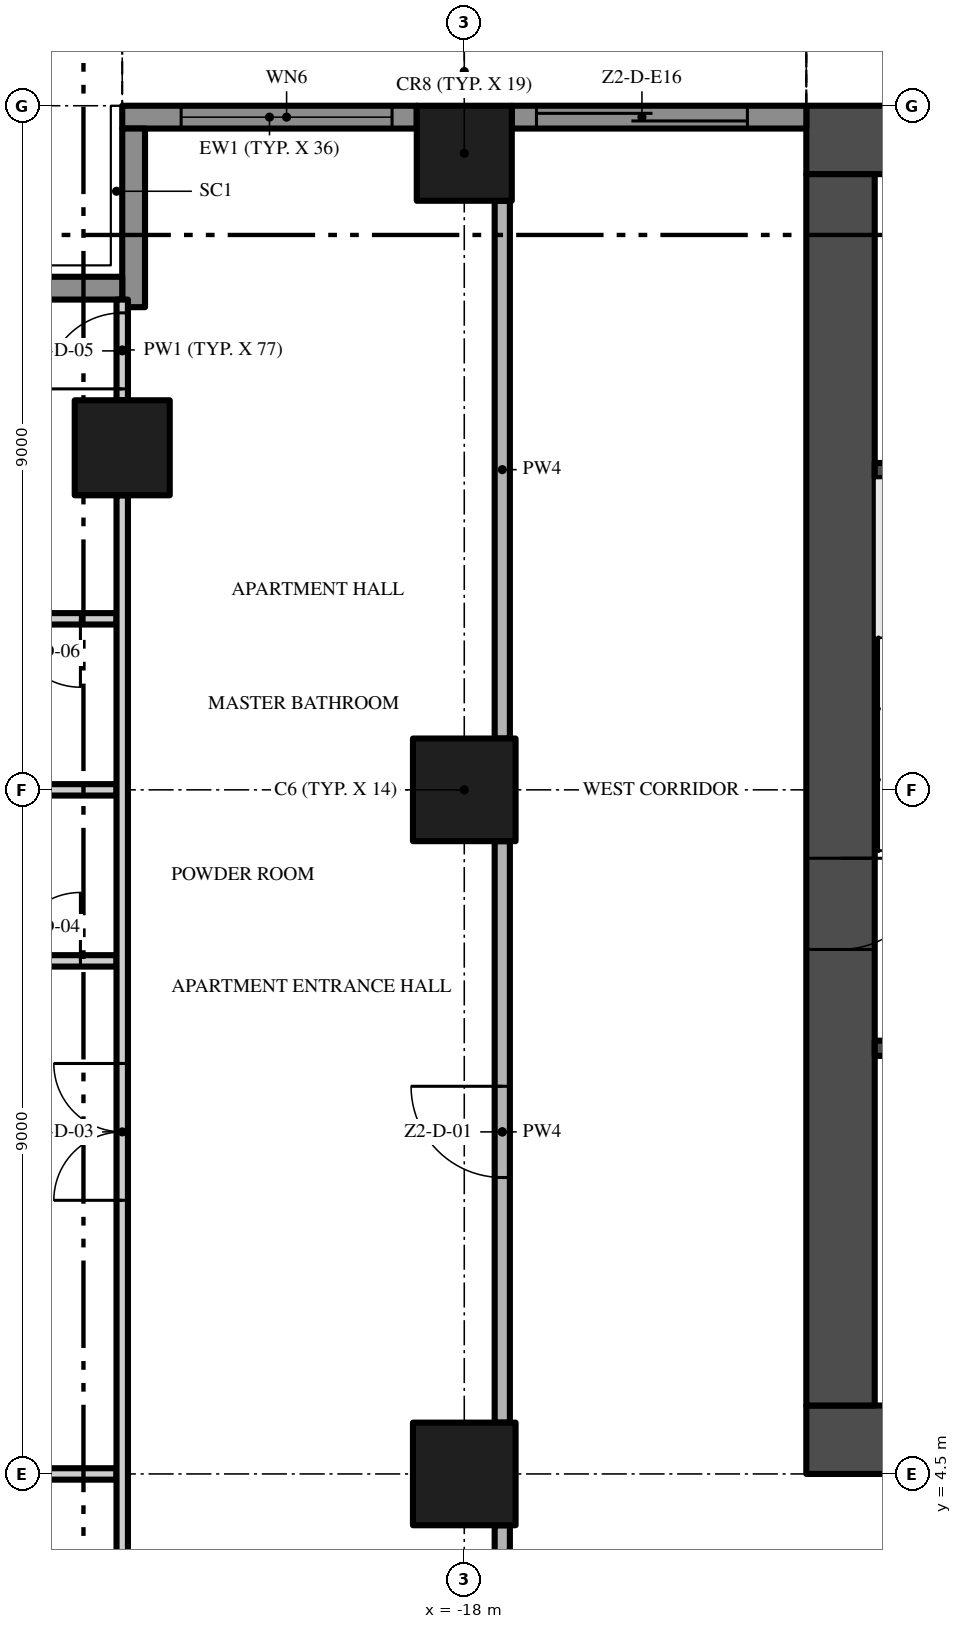
"""IFC4 building model, lengths in metres.
Left out: names, types, materials, properties, quantities, classifications, styles, units other than length and angle.
Written with IfcOpenShell. Run it as: python <this file> out.ifc"""

import sys

from ifc_helpers import new_model, si_unit, direction, frame, frame_2d, origin, origin_2d, place, context, subcontext, project, spatial, rectangle, extrude, element, fill, save


model = new_model("IFC4")
c1 = context("Model", 3, precision=1e-05, world=origin(), true_north=direction((0.0, 1.0)))
c2 = subcontext(c1, "Body", "Model", "MODEL_VIEW")
j1 = project(units=[si_unit("LENGTHUNIT", "METRE"), si_unit("PLANEANGLEUNIT", "RADIAN")], contexts=[c1])
p1 = place(None, origin())
s1 = spatial("IfcSite", under=j1, at=p1, CompositionType="ELEMENT")
p2 = place(p1, origin())
s2 = spatial("IfcBuilding", under=s1, at=p2, CompositionType="ELEMENT")
p3 = place(p2, frame((0.0, 0.0, 107.4)))
s3 = spatial("IfcBuildingStorey", under=s2, at=p3, CompositionType="ELEMENT", Elevation=107.4)
p4 = place(p3, frame((-13.5, 4.95, -0.3), z_axis=(0.0, 0.0, 1.0), x_axis=(1.0, 0.0, 0.0)))
e1 = element("IfcWall", 1, at=p4, inside=s3, PredefinedType="SHEAR", context=c2, shape_type="SweptSolid", body=[
    extrude(rectangle(XDim=27.0, YDim=0.9, at=frame_2d((13.5, 0.0))), origin(), (0.0, 0.0, 1.0), 3.8),
])
p5 = place(p4, frame((12.0, 0.0, 0.3)))
e2 = element("IfcOpeningElement", 2, at=p5, cuts=e1, PredefinedType="OPENING", context=c2, shape_type="SweptSolid", body=[
    extrude(rectangle(XDim=3.0, YDim=2.4, at=frame_2d((1.5, 1.2))), frame((0.0, 0.46, 0.0), z_axis=(0.0, -1.0, 0.0), x_axis=(1.0, 0.0, 0.0)), (0.0, 0.0, 1.0), 0.92),
])
p6 = place(p4, frame((4.9, 0.0, 0.3)))
e3 = element("IfcOpeningElement", 3, at=p6, cuts=e1, PredefinedType="OPENING", context=c2, shape_type="SweptSolid", body=[
    extrude(rectangle(XDim=1.2, YDim=2.2, at=frame_2d((0.6, 1.1))), frame((0.0, 0.46, 0.0), z_axis=(0.0, -1.0, 0.0), x_axis=(1.0, 0.0, 0.0)), (0.0, 0.0, 1.0), 0.92),
])
p7 = place(p4, frame((20.75, 0.0, 0.3)))
e4 = element("IfcOpeningElement", 4, at=p7, cuts=e1, PredefinedType="OPENING", context=c2, shape_type="SweptSolid", body=[
    extrude(rectangle(XDim=1.5, YDim=2.2, at=frame_2d((0.75, 1.1))), frame((0.0, 0.46, 0.0), z_axis=(0.0, -1.0, 0.0), x_axis=(1.0, 0.0, 0.0)), (0.0, 0.0, 1.0), 0.92),
])
p8 = place(p4, frame((17.4, 0.0, 0.3)))
e5 = element("IfcOpeningElement", 5, at=p8, cuts=e1, PredefinedType="OPENING", context=c2, shape_type="SweptSolid", body=[
    extrude(rectangle(XDim=1.2, YDim=2.2, at=frame_2d((0.6, 1.1))), frame((0.0, 0.46, 0.0), z_axis=(0.0, -1.0, 0.0), x_axis=(1.0, 0.0, 0.0)), (0.0, 0.0, 1.0), 0.92),
])
p9 = place(p3, frame((13.5, 22.05, -0.3), z_axis=(0.0, 0.0, 1.0), x_axis=(-1.0, 0.0, 0.0)))
e6 = element("IfcWall", 6, at=p9, inside=s3, PredefinedType="SHEAR", context=c2, shape_type="SweptSolid", body=[
    extrude(rectangle(XDim=27.0, YDim=0.9, at=frame_2d((13.5, 0.0))), origin(), (0.0, 0.0, 1.0), 3.8),
])
p10 = place(p3, frame((-13.05, 21.6, -0.3), z_axis=(0.0, 0.0, 1.0), x_axis=(0.0, -1.0, 0.0)))
e7 = element("IfcWall", 7, at=p10, inside=s3, PredefinedType="SHEAR", context=c2, shape_type="SweptSolid", body=[
    extrude(rectangle(XDim=16.2, YDim=0.9, at=frame_2d((8.1, 0.0))), origin(), (0.0, 0.0, 1.0), 3.8),
])
p11 = place(p10, frame((9.0, 0.0, 0.3)))
e8 = element("IfcOpeningElement", 8, at=p11, cuts=e7, PredefinedType="OPENING", context=c2, shape_type="SweptSolid", body=[
    extrude(rectangle(XDim=1.2, YDim=2.2, at=frame_2d((0.6, 1.1))), frame((0.0, 0.46, 0.0), z_axis=(0.0, -1.0, 0.0), x_axis=(1.0, 0.0, 0.0)), (0.0, 0.0, 1.0), 0.92),
])
p12 = place(p3, frame((-18.0, 13.5, 0.0), z_axis=(0.0, 0.0, 1.0), x_axis=(1.0, 0.0, 0.0)))
e9 = element("IfcColumn", 9, at=p12, inside=s3, PredefinedType="COLUMN", context=c2, shape_type="SweptSolid", body=[
    extrude(rectangle(XDim=1.35, YDim=1.35, at=origin_2d()), origin(), (0.0, 0.0, 1.0), 3.5),
])
p13 = place(p3, frame((-18.0, 21.875, 0.0), z_axis=(0.0, 0.0, 1.0), x_axis=(1.0, 0.0, 0.0)))
e10 = element("IfcColumn", 10, at=p13, inside=s3, PredefinedType="COLUMN", context=c2, shape_type="SweptSolid", body=[
    extrude(rectangle(XDim=1.25, YDim=1.25, at=origin_2d()), origin(), (0.0, 0.0, 1.0), 3.5),
])
p14 = place(p3, frame((-18.0, 4.5, 0.0), z_axis=(0.0, 0.0, 1.0), x_axis=(1.0, 0.0, 0.0)))
e11 = element("IfcColumn", 11, at=p14, inside=s3, PredefinedType="COLUMN", context=c2, shape_type="SweptSolid", body=[
    extrude(rectangle(XDim=1.35, YDim=1.35, at=origin_2d()), origin(), (0.0, 0.0, 1.0), 3.5),
])
p15 = place(p3, frame((-22.5, 18.0, 0.0), z_axis=(0.0, 0.0, 1.0), x_axis=(1.0, 0.0, 0.0)))
e12 = element("IfcColumn", 12, at=p15, inside=s3, PredefinedType="COLUMN", context=c2, shape_type="SweptSolid", body=[
    extrude(rectangle(XDim=1.25, YDim=1.25, at=origin_2d()), origin(), (0.0, 0.0, 1.0), 3.5),
])
p16 = place(p3, frame((-17.375, 22.35, 0.0), z_axis=(0.0, 0.0, 1.0), x_axis=(1.0, 0.0, 0.0)))
e13 = element("IfcWall", 13, at=p16, inside=s3, PredefinedType="SOLIDWALL", context=c2, shape_type="SweptSolid", body=[
    extrude(rectangle(XDim=3.875, YDim=0.3, at=frame_2d((1.938, 0.0))), origin(), (0.0, 0.0, 1.0), 3.5),
])
p17 = place(p16, frame((0.325, 0.0, 0.0)))
e14 = element("IfcOpeningElement", 14, at=p17, cuts=e13, PredefinedType="OPENING", context=c2, shape_type="SweptSolid", body=[
    extrude(rectangle(XDim=2.775, YDim=2.4, at=frame_2d((1.387, 1.2))), frame((0.0, 0.16, 0.0), z_axis=(0.0, -1.0, 0.0), x_axis=(1.0, 0.0, 0.0)), (0.0, 0.0, 1.0), 0.32),
])
p18 = place(p3, frame((-22.5, 22.35, 0.0), z_axis=(0.0, 0.0, 1.0), x_axis=(1.0, 0.0, 0.0)))
e15 = element("IfcWall", 15, at=p18, inside=s3, PredefinedType="SOLIDWALL", context=c2, shape_type="SweptSolid", body=[
    extrude(rectangle(XDim=3.875, YDim=0.3, at=frame_2d((1.938, 0.0))), origin(), (0.0, 0.0, 1.0), 3.5),
])
p19 = place(p18, frame((0.775, 0.0, 0.45)))
e16 = element("IfcOpeningElement", 16, at=p19, cuts=e15, PredefinedType="OPENING", context=c2, shape_type="SweptSolid", body=[
    extrude(rectangle(XDim=2.775, YDim=2.65, at=frame_2d((1.387, 1.325))), frame((0.0, 0.16, 0.0), z_axis=(0.0, -1.0, 0.0), x_axis=(1.0, 0.0, 0.0)), (0.0, 0.0, 1.0), 0.32),
])
p20 = place(p3, frame((-22.35, 19.85, 0.0), z_axis=(0.0, 0.0, 1.0), x_axis=(0.0, 1.0, 0.0)))
e17 = element("IfcWall", 17, at=p20, inside=s3, PredefinedType="SOLIDWALL", context=c2, shape_type="SweptSolid", body=[
    extrude(rectangle(XDim=2.35, YDim=0.3, at=frame_2d((1.175, 0.0))), origin(), (0.0, 0.0, 1.0), 3.5),
])
p21 = place(p3, frame((-24.75, 20.1, 0.0), z_axis=(0.0, 0.0, 1.0), x_axis=(1.0, 0.0, 0.0)))
e18 = element("IfcWall", 18, at=p21, inside=s3, PredefinedType="SOLIDWALL", context=c2, shape_type="SweptSolid", body=[
    extrude(rectangle(XDim=2.25, YDim=0.3, at=frame_2d((1.125, 0.0))), origin(), (0.0, 0.0, 1.0), 3.5),
])
for number, where, z_axis, x_axis in (
    (19, (-12.6, 10.1, 0.0), (0.0, 0.0, 1.0), (1.0, 0.0, 0.0)),
    (20, (-12.6, 17.7, 0.0), (0.0, 0.0, 1.0), (1.0, 0.0, 0.0)),
):
    element("IfcWall", number, at=place(p3, frame(where, z_axis=z_axis, x_axis=x_axis)), inside=s3, PredefinedType="SHEAR", context=c2, shape_type="SweptSolid", body=[
        extrude(rectangle(XDim=2.95, YDim=0.2, at=frame_2d((1.475, 0.0))), origin(), (0.0, 0.0, 1.0), 3.5),
    ])
p22 = place(p3, frame((-25.75, 4.5, 0.0), z_axis=(0.0, 0.0, 1.0), x_axis=(1.0, 0.0, 0.0)))
e21 = element("IfcWall", 21, at=p22, inside=s3, PredefinedType="PARTITIONING", context=c2, shape_type="SweptSolid", body=[
    extrude(rectangle(XDim=3.175, YDim=0.15, at=frame_2d((1.587, 0.0))), origin(), (0.0, 0.0, 1.0), 3.5),
])
p23 = place(p3, frame((-24.45, 11.25, 0.0), z_axis=(0.0, 0.0, 1.0), x_axis=(1.0, 0.0, 0.0)))
e22 = element("IfcWall", 22, at=p23, inside=s3, PredefinedType="PARTITIONING", context=c2, shape_type="SweptSolid", body=[
    extrude(rectangle(XDim=1.875, YDim=0.15, at=frame_2d((0.938, 0.0))), origin(), (0.0, 0.0, 1.0), 3.5),
])
p24 = place(p23, frame((0.5, 0.0, 0.0)))
e23 = element("IfcOpeningElement", 23, at=p24, cuts=e22, PredefinedType="OPENING", context=c2, shape_type="SweptSolid", body=[
    extrude(rectangle(XDim=0.9, YDim=2.1, at=frame_2d((0.45, 1.05))), frame((0.0, 0.085, 0.0), z_axis=(0.0, -1.0, 0.0), x_axis=(1.0, 0.0, 0.0)), (0.0, 0.0, 1.0), 0.17),
])
p25 = place(p3, frame((-24.45, 13.5, 0.0), z_axis=(0.0, 0.0, 1.0), x_axis=(1.0, 0.0, 0.0)))
e24 = element("IfcWall", 24, at=p25, inside=s3, PredefinedType="PARTITIONING", context=c2, shape_type="SweptSolid", body=[
    extrude(rectangle(XDim=1.875, YDim=0.15, at=frame_2d((0.938, 0.0))), origin(), (0.0, 0.0, 1.0), 3.5),
])
p26 = place(p3, frame((-22.575, 15.75, 0.0), z_axis=(0.0, 0.0, 1.0), x_axis=(-1.0, 0.0, 0.0)))
e25 = element("IfcWall", 25, at=p26, inside=s3, PredefinedType="PARTITIONING", context=c2, shape_type="SweptSolid", body=[
    extrude(rectangle(XDim=1.875, YDim=0.15, at=frame_2d((0.938, 0.0))), origin(), (0.0, 0.0, 1.0), 3.5),
])
p27 = place(p26, frame((0.475, 0.0, 0.0)))
e26 = element("IfcOpeningElement", 26, at=p27, cuts=e25, PredefinedType="OPENING", context=c2, shape_type="SweptSolid", body=[
    extrude(rectangle(XDim=0.9, YDim=2.1, at=frame_2d((0.45, 1.05))), frame((0.0, 0.085, 0.0), z_axis=(0.0, -1.0, 0.0), x_axis=(1.0, 0.0, 0.0)), (0.0, 0.0, 1.0), 0.17),
])
p28 = place(p3, frame((-22.5, 0.1, 0.0), z_axis=(0.0, 0.0, 1.0), x_axis=(0.0, 1.0, 0.0)))
e27 = element("IfcWall", 27, at=p28, inside=s3, PredefinedType="PARTITIONING", context=c2, shape_type="SweptSolid", body=[
    extrude(rectangle(XDim=17.275, YDim=0.15, at=frame_2d((8.637, 0.0))), origin(), (0.0, 0.0, 1.0), 3.5),
])
p29 = place(p28, frame((1.65, 0.0, 0.0)))
e28 = element("IfcOpeningElement", 28, at=p29, cuts=e27, PredefinedType="OPENING", context=c2, shape_type="SweptSolid", body=[
    extrude(rectangle(XDim=1.0, YDim=2.4, at=frame_2d((0.5, 1.2))), frame((0.0, 0.085, 0.0), z_axis=(0.0, -1.0, 0.0), x_axis=(1.0, 0.0, 0.0)), (0.0, 0.0, 1.0), 0.17),
])
p30 = place(p28, frame((8.0, 0.0, 0.0)))
e29 = element("IfcOpeningElement", 29, at=p30, cuts=e27, PredefinedType="OPENING", context=c2, shape_type="SweptSolid", body=[
    extrude(rectangle(XDim=1.8, YDim=2.4, at=frame_2d((0.9, 1.2))), frame((0.0, 0.085, 0.0), z_axis=(0.0, -1.0, 0.0), x_axis=(1.0, 0.0, 0.0)), (0.0, 0.0, 1.0), 0.17),
])
p31 = place(p3, frame((-22.5, 18.625, 0.0), z_axis=(0.0, 0.0, 1.0), x_axis=(0.0, 1.0, 0.0)))
e30 = element("IfcWall", 30, at=p31, inside=s3, PredefinedType="PARTITIONING", context=c2, shape_type="SweptSolid", body=[
    extrude(rectangle(XDim=1.325, YDim=0.15, at=frame_2d((0.662, 0.0))), origin(), (0.0, 0.0, 1.0), 3.5),
])
p32 = place(p31, frame((0.15, 0.0, 0.0)))
e31 = element("IfcOpeningElement", 31, at=p32, cuts=e30, PredefinedType="OPENING", context=c2, shape_type="SweptSolid", body=[
    extrude(rectangle(XDim=1.0, YDim=2.4, at=frame_2d((0.5, 1.2))), frame((0.0, 0.085, 0.0), z_axis=(0.0, -1.0, 0.0), x_axis=(1.0, 0.0, 0.0)), (0.0, 0.0, 1.0), 0.17),
])
p33 = place(p3, frame((-17.5, -0.2, 0.0), z_axis=(0.0, 0.0, 1.0), x_axis=(0.0, 1.0, 0.0)))
e32 = element("IfcWall", 32, at=p33, inside=s3, PredefinedType="PARTITIONING", context=c2, shape_type="SweptSolid", body=[
    extrude(rectangle(XDim=4.025, YDim=0.2, at=frame_2d((2.013, 0.0))), origin(), (0.0, 0.0, 1.0), 3.5),
])
p34 = place(p3, frame((-17.5, 5.175, 0.0), z_axis=(0.0, 0.0, 1.0), x_axis=(0.0, 1.0, 0.0)))
e33 = element("IfcWall", 33, at=p34, inside=s3, PredefinedType="PARTITIONING", context=c2, shape_type="SweptSolid", body=[
    extrude(rectangle(XDim=7.65, YDim=0.2, at=frame_2d((3.825, 0.0))), origin(), (0.0, 0.0, 1.0), 3.5),
])
p35 = place(p34, frame((3.225, 0.0, 0.0)))
e34 = element("IfcOpeningElement", 34, at=p35, cuts=e33, PredefinedType="OPENING", context=c2, shape_type="SweptSolid", body=[
    extrude(rectangle(XDim=1.2, YDim=2.4, at=frame_2d((0.6, 1.2))), frame((0.0, 0.11, 0.0), z_axis=(0.0, -1.0, 0.0), x_axis=(1.0, 0.0, 0.0)), (0.0, 0.0, 1.0), 0.22),
])
p36 = place(p3, frame((-17.5, 14.175, 0.0), z_axis=(0.0, 0.0, 1.0), x_axis=(0.0, 1.0, 0.0)))
e35 = element("IfcWall", 35, at=p36, inside=s3, PredefinedType="PARTITIONING", context=c2, shape_type="SweptSolid", body=[
    extrude(rectangle(XDim=7.075, YDim=0.2, at=frame_2d((3.538, 0.0))), origin(), (0.0, 0.0, 1.0), 3.5),
])
p37 = place(p17, origin())
e36 = element("IfcDoor", 36, at=p37, inside=s3, OperationType="SINGLE_SWING_LEFT", PredefinedType="DOOR", context=c2, shape_type="SweptSolid", body=[
    extrude(rectangle(XDim=2.775, YDim=2.4, at=frame_2d((1.387, 1.2))), frame((0.0, 0.025, 0.0), z_axis=(0.0, -1.0, 0.0), x_axis=(1.0, 0.0, 0.0)), (0.0, 0.0, 1.0), 0.05),
])
fill(e14, e36)
p38 = place(p19, origin())
e37 = element("IfcWindow", 37, at=p38, inside=s3, PartitioningType="SINGLE_PANEL", PredefinedType="WINDOW", context=c2, shape_type="SweptSolid", body=[
    extrude(rectangle(XDim=2.775, YDim=2.65, at=frame_2d((1.387, 1.325))), frame((0.0, 0.03, 0.0), z_axis=(0.0, -1.0, 0.0), x_axis=(1.0, 0.0, 0.0)), (0.0, 0.0, 1.0), 0.06),
])
fill(e16, e37)
p39 = place(p11, frame((1.2, 0.0, 0.0), z_axis=(0.0, 0.0, 1.0), x_axis=(-1.0, 0.0, 0.0)))
e38 = element("IfcDoor", 38, at=p39, inside=s3, OperationType="SINGLE_SWING_RIGHT", PredefinedType="DOOR", context=c2, shape_type="SweptSolid", body=[
    extrude(rectangle(XDim=1.2, YDim=2.2, at=frame_2d((0.6, 1.1))), frame((0.0, 0.025, 0.0), z_axis=(0.0, -1.0, 0.0), x_axis=(1.0, 0.0, 0.0)), (0.0, 0.0, 1.0), 0.05),
])
fill(e8, e38)
p40 = place(p35, origin())
e39 = element("IfcDoor", 39, at=p40, inside=s3, OperationType="SINGLE_SWING_RIGHT", PredefinedType="DOOR", context=c2, shape_type="SweptSolid", body=[
    extrude(rectangle(XDim=1.2, YDim=2.4, at=frame_2d((0.6, 1.2))), frame((0.0, 0.025, 0.0), z_axis=(0.0, -1.0, 0.0), x_axis=(1.0, 0.0, 0.0)), (0.0, 0.0, 1.0), 0.05),
])
fill(e34, e39)
p41 = place(p30, origin())
e40 = element("IfcDoor", 40, at=p41, inside=s3, OperationType="DOUBLE_DOOR_SINGLE_SWING", PredefinedType="DOOR", context=c2, shape_type="SweptSolid", body=[
    extrude(rectangle(XDim=1.8, YDim=2.4, at=frame_2d((0.9, 1.2))), frame((0.0, 0.025, 0.0), z_axis=(0.0, -1.0, 0.0), x_axis=(1.0, 0.0, 0.0)), (0.0, 0.0, 1.0), 0.05),
])
fill(e29, e40)
p42 = place(p24, origin())
e41 = element("IfcDoor", 41, at=p42, inside=s3, OperationType="SINGLE_SWING_RIGHT", PredefinedType="DOOR", context=c2, shape_type="SweptSolid", body=[
    extrude(rectangle(XDim=0.9, YDim=2.1, at=frame_2d((0.45, 1.05))), frame((0.0, 0.025, 0.0), z_axis=(0.0, -1.0, 0.0), x_axis=(1.0, 0.0, 0.0)), (0.0, 0.0, 1.0), 0.05),
])
fill(e23, e41)
p43 = place(p32, origin())
e42 = element("IfcDoor", 42, at=p43, inside=s3, OperationType="SINGLE_SWING_LEFT", PredefinedType="DOOR", context=c2, shape_type="SweptSolid", body=[
    extrude(rectangle(XDim=1.0, YDim=2.4, at=frame_2d((0.5, 1.2))), frame((0.0, 0.025, 0.0), z_axis=(0.0, -1.0, 0.0), x_axis=(1.0, 0.0, 0.0)), (0.0, 0.0, 1.0), 0.05),
])
fill(e31, e42)
p44 = place(p27, origin())
e43 = element("IfcDoor", 43, at=p44, inside=s3, OperationType="SINGLE_SWING_LEFT", PredefinedType="DOOR", context=c2, shape_type="SweptSolid", body=[
    extrude(rectangle(XDim=0.9, YDim=2.1, at=frame_2d((0.45, 1.05))), frame((0.0, 0.025, 0.0), z_axis=(0.0, -1.0, 0.0), x_axis=(1.0, 0.0, 0.0)), (0.0, 0.0, 1.0), 0.05),
])
fill(e26, e43)
save(model, sys.argv[1])
